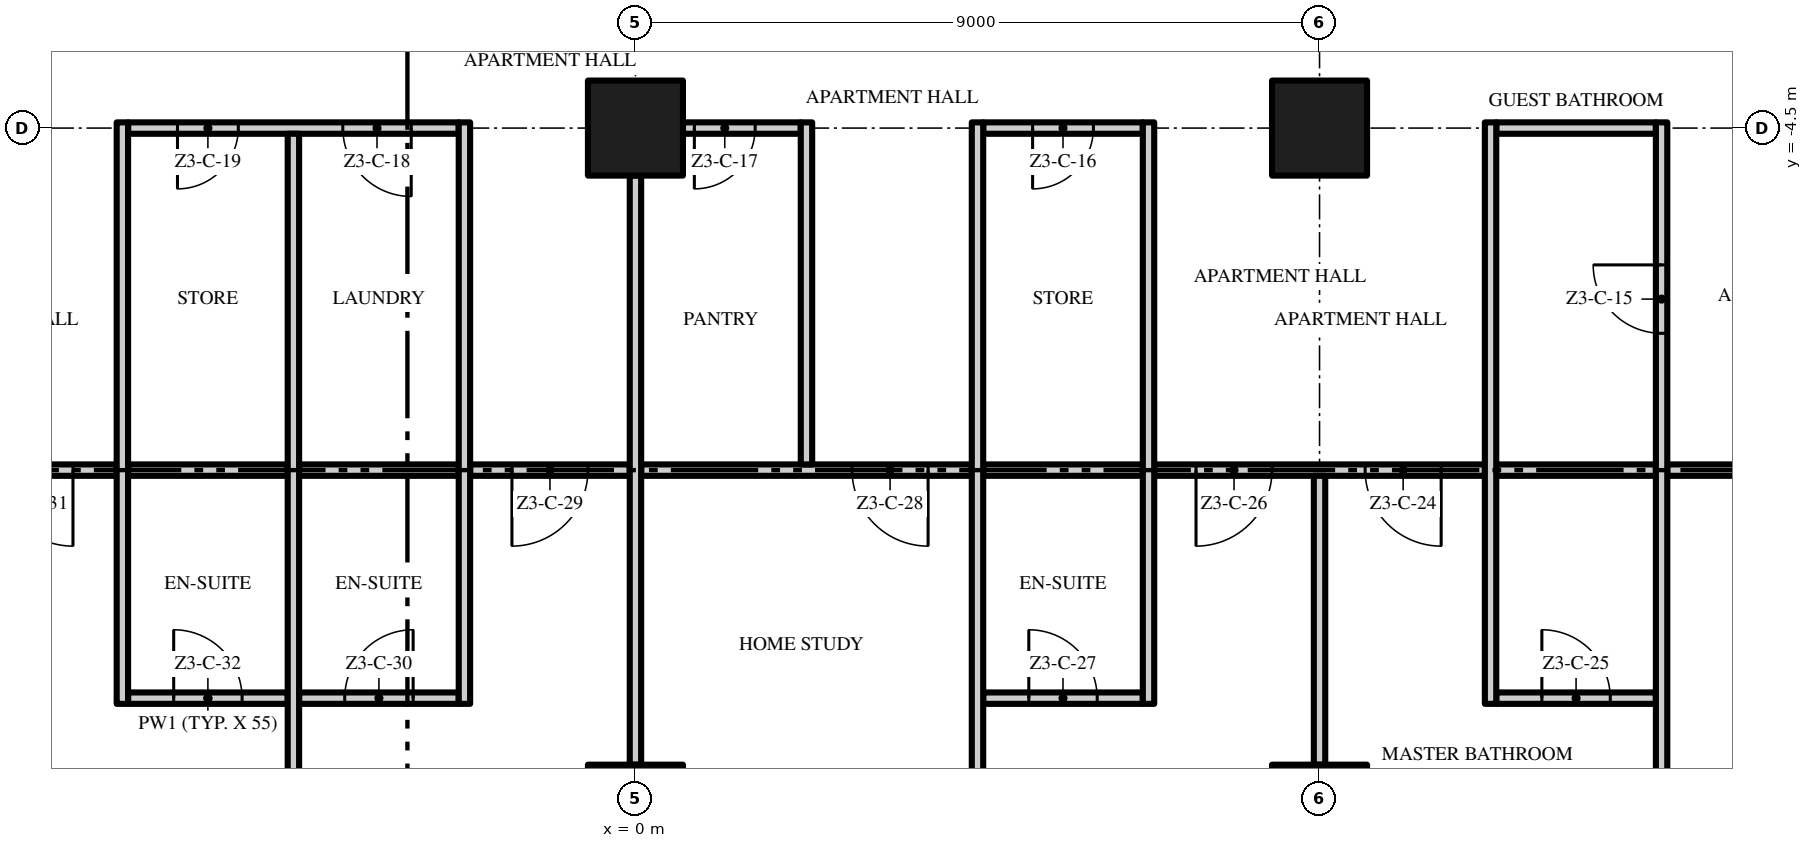
"""IFC4 building model, lengths in metres.
Left out: names, types, materials, properties, quantities, classifications, styles, units other than length and angle.
Written with IfcOpenShell. Run it as: python <this file> out.ifc"""

import sys

from ifc_helpers import new_model, si_unit, direction, frame, frame_2d, origin, origin_2d, place, context, subcontext, project, spatial, rectangle, extrude, element, fill, save


model = new_model("IFC4")
c1 = context("Model", 3, precision=1e-05, world=origin(), true_north=direction((0.0, 1.0)))
c2 = subcontext(c1, "Body", "Model", "MODEL_VIEW")
j1 = project(units=[si_unit("LENGTHUNIT", "METRE"), si_unit("PLANEANGLEUNIT", "RADIAN")], contexts=[c1])
p1 = place(None, origin())
s1 = spatial("IfcSite", under=j1, at=p1, CompositionType="ELEMENT")
p2 = place(p1, origin())
s2 = spatial("IfcBuilding", under=s1, at=p2, CompositionType="ELEMENT")
p3 = place(p2, frame((0.0, 0.0, 151.6)))
s3 = spatial("IfcBuildingStorey", under=s2, at=p3, CompositionType="ELEMENT", Elevation=151.6)
for number, where, z_axis, x_axis in (
    (1, (0.0, -13.5, 0.0), (0.0, 0.0, 1.0), (1.0, 0.0, 0.0)),
    (2, (0.0, -4.5, 0.0), (0.0, 0.0, 1.0), (1.0, 0.0, 0.0)),
    (3, (9.0, -13.5, 0.0), (0.0, 0.0, 1.0), (1.0, 0.0, 0.0)),
    (4, (9.0, -4.5, 0.0), (0.0, 0.0, 1.0), (1.0, 0.0, 0.0)),
):
    element("IfcColumn", number, at=place(p3, frame(where, z_axis=z_axis, x_axis=x_axis)), inside=s3, PredefinedType="COLUMN", context=c2, shape_type="SweptSolid", body=[
        extrude(rectangle(XDim=1.25, YDim=1.25, at=origin_2d()), origin(), (0.0, 0.0, 1.0), 3.5),
    ])
p4 = place(p3, frame((-6.675, -12.0, 0.0), z_axis=(0.0, 0.0, 1.0), x_axis=(1.0, 0.0, 0.0)))
e5 = element("IfcWall", 5, at=p4, inside=s3, PredefinedType="PARTITIONING", context=c2, shape_type="SweptSolid", body=[
    extrude(rectangle(XDim=2.1, YDim=0.15, at=frame_2d((1.05, 0.0))), origin(), (0.0, 0.0, 1.0), 3.5),
])
p5 = place(p4, frame((0.6, 0.0, 0.0)))
e6 = element("IfcOpeningElement", 6, at=p5, cuts=e5, PredefinedType="OPENING", context=c2, shape_type="SweptSolid", body=[
    extrude(rectangle(XDim=0.9, YDim=2.1, at=frame_2d((0.45, 1.05))), frame((0.0, 0.085, 0.0), z_axis=(0.0, -1.0, 0.0), x_axis=(1.0, 0.0, 0.0)), (0.0, 0.0, 1.0), 0.17),
])
p6 = place(p3, frame((-4.425, -12.0, 0.0), z_axis=(0.0, 0.0, 1.0), x_axis=(1.0, 0.0, 0.0)))
e7 = element("IfcWall", 7, at=p6, inside=s3, PredefinedType="PARTITIONING", context=c2, shape_type="SweptSolid", body=[
    extrude(rectangle(XDim=2.1, YDim=0.15, at=frame_2d((1.05, 0.0))), origin(), (0.0, 0.0, 1.0), 3.5),
])
p7 = place(p6, frame((0.6, 0.0, 0.0)))
e8 = element("IfcOpeningElement", 8, at=p7, cuts=e7, PredefinedType="OPENING", context=c2, shape_type="SweptSolid", body=[
    extrude(rectangle(XDim=0.9, YDim=2.1, at=frame_2d((0.45, 1.05))), frame((0.0, 0.085, 0.0), z_axis=(0.0, -1.0, 0.0), x_axis=(1.0, 0.0, 0.0)), (0.0, 0.0, 1.0), 0.17),
])
p8 = place(p3, frame((4.575, -12.0, 0.0), z_axis=(0.0, 0.0, 1.0), x_axis=(1.0, 0.0, 0.0)))
e9 = element("IfcWall", 9, at=p8, inside=s3, PredefinedType="PARTITIONING", context=c2, shape_type="SweptSolid", body=[
    extrude(rectangle(XDim=2.1, YDim=0.15, at=frame_2d((1.05, 0.0))), origin(), (0.0, 0.0, 1.0), 3.5),
])
p9 = place(p8, frame((0.6, 0.0, 0.0)))
e10 = element("IfcOpeningElement", 10, at=p9, cuts=e9, PredefinedType="OPENING", context=c2, shape_type="SweptSolid", body=[
    extrude(rectangle(XDim=0.9, YDim=2.1, at=frame_2d((0.45, 1.05))), frame((0.0, 0.085, 0.0), z_axis=(0.0, -1.0, 0.0), x_axis=(1.0, 0.0, 0.0)), (0.0, 0.0, 1.0), 0.17),
])
p10 = place(p3, frame((11.325, -12.0, 0.0), z_axis=(0.0, 0.0, 1.0), x_axis=(1.0, 0.0, 0.0)))
e11 = element("IfcWall", 11, at=p10, inside=s3, PredefinedType="PARTITIONING", context=c2, shape_type="SweptSolid", body=[
    extrude(rectangle(XDim=2.1, YDim=0.15, at=frame_2d((1.05, 0.0))), origin(), (0.0, 0.0, 1.0), 3.5),
])
p11 = place(p10, frame((0.6, 0.0, 0.0)))
e12 = element("IfcOpeningElement", 12, at=p11, cuts=e11, PredefinedType="OPENING", context=c2, shape_type="SweptSolid", body=[
    extrude(rectangle(XDim=0.9, YDim=2.1, at=frame_2d((0.45, 1.05))), frame((0.0, 0.085, 0.0), z_axis=(0.0, -1.0, 0.0), x_axis=(1.0, 0.0, 0.0)), (0.0, 0.0, 1.0), 0.17),
])
p12 = place(p3, frame((-6.825, -9.0, 0.0), z_axis=(0.0, 0.0, 1.0), x_axis=(-1.0, 0.0, 0.0)))
e13 = element("IfcWall", 13, at=p12, inside=s3, PredefinedType="PARTITIONING", context=c2, shape_type="SweptSolid", body=[
    extrude(rectangle(XDim=11.1, YDim=0.15, at=frame_2d((5.55, 0.0))), origin(), (0.0, 0.0, 1.0), 3.5),
])
p13 = place(p12, frame((0.575, 0.0, 0.0)))
e14 = element("IfcOpeningElement", 14, at=p13, cuts=e13, PredefinedType="OPENING", context=c2, shape_type="SweptSolid", body=[
    extrude(rectangle(XDim=1.0, YDim=2.4, at=frame_2d((0.5, 1.2))), frame((0.0, 0.085, 0.0), z_axis=(0.0, -1.0, 0.0), x_axis=(1.0, 0.0, 0.0)), (0.0, 0.0, 1.0), 0.17),
])
p14 = place(p12, frame((3.325, 0.0, 0.0)))
e15 = element("IfcOpeningElement", 15, at=p14, cuts=e13, PredefinedType="OPENING", context=c2, shape_type="SweptSolid", body=[
    extrude(rectangle(XDim=1.5, YDim=2.4, at=frame_2d((0.75, 1.2))), frame((0.0, 0.085, 0.0), z_axis=(0.0, -1.0, 0.0), x_axis=(1.0, 0.0, 0.0)), (0.0, 0.0, 1.0), 0.17),
])
for number, where, z_axis, x_axis in (
    (16, (-6.675, -9.0, 0.0), (0.0, 0.0, 1.0), (1.0, 0.0, 0.0)),
    (17, (-4.425, -9.0, 0.0), (0.0, 0.0, 1.0), (1.0, 0.0, 0.0)),
):
    element("IfcWall", number, at=place(p3, frame(where, z_axis=z_axis, x_axis=x_axis)), inside=s3, PredefinedType="PARTITIONING", context=c2, shape_type="SweptSolid", body=[
        extrude(rectangle(XDim=2.1, YDim=0.15, at=frame_2d((1.05, 0.0))), origin(), (0.0, 0.0, 1.0), 3.5),
    ])
p15 = place(p3, frame((-0.075, -9.0, 0.0), z_axis=(0.0, 0.0, 1.0), x_axis=(-1.0, 0.0, 0.0)))
e18 = element("IfcWall", 18, at=p15, inside=s3, PredefinedType="PARTITIONING", context=c2, shape_type="SweptSolid", body=[
    extrude(rectangle(XDim=2.1, YDim=0.15, at=frame_2d((1.05, 0.0))), origin(), (0.0, 0.0, 1.0), 3.5),
])
p16 = place(p15, frame((0.55, 0.0, 0.0)))
e19 = element("IfcOpeningElement", 19, at=p16, cuts=e18, PredefinedType="OPENING", context=c2, shape_type="SweptSolid", body=[
    extrude(rectangle(XDim=1.0, YDim=2.4, at=frame_2d((0.5, 1.2))), frame((0.0, 0.085, 0.0), z_axis=(0.0, -1.0, 0.0), x_axis=(1.0, 0.0, 0.0)), (0.0, 0.0, 1.0), 0.17),
])
p17 = place(p3, frame((4.425, -9.0, 0.0), z_axis=(0.0, 0.0, 1.0), x_axis=(-1.0, 0.0, 0.0)))
e20 = element("IfcWall", 20, at=p17, inside=s3, PredefinedType="PARTITIONING", context=c2, shape_type="SweptSolid", body=[
    extrude(rectangle(XDim=4.35, YDim=0.15, at=frame_2d((2.175, 0.0))), origin(), (0.0, 0.0, 1.0), 3.5),
])
p18 = place(p17, frame((0.575, 0.0, 0.0)))
e21 = element("IfcOpeningElement", 21, at=p18, cuts=e20, PredefinedType="OPENING", context=c2, shape_type="SweptSolid", body=[
    extrude(rectangle(XDim=1.0, YDim=2.4, at=frame_2d((0.5, 1.2))), frame((0.0, 0.085, 0.0), z_axis=(0.0, -1.0, 0.0), x_axis=(1.0, 0.0, 0.0)), (0.0, 0.0, 1.0), 0.17),
])
p19 = place(p3, frame((4.575, -9.0, 0.0), z_axis=(0.0, 0.0, 1.0), x_axis=(1.0, 0.0, 0.0)))
e22 = element("IfcWall", 22, at=p19, inside=s3, PredefinedType="PARTITIONING", context=c2, shape_type="SweptSolid", body=[
    extrude(rectangle(XDim=2.1, YDim=0.15, at=frame_2d((1.05, 0.0))), origin(), (0.0, 0.0, 1.0), 3.5),
])
p20 = place(p3, frame((11.175, -9.0, 0.0), z_axis=(0.0, 0.0, 1.0), x_axis=(-1.0, 0.0, 0.0)))
e23 = element("IfcWall", 23, at=p20, inside=s3, PredefinedType="PARTITIONING", context=c2, shape_type="SweptSolid", body=[
    extrude(rectangle(XDim=4.35, YDim=0.15, at=frame_2d((2.175, 0.0))), origin(), (0.0, 0.0, 1.0), 3.5),
])
p21 = place(p20, frame((0.575, 0.0, 0.0)))
e24 = element("IfcOpeningElement", 24, at=p21, cuts=e23, PredefinedType="OPENING", context=c2, shape_type="SweptSolid", body=[
    extrude(rectangle(XDim=1.0, YDim=2.4, at=frame_2d((0.5, 1.2))), frame((0.0, 0.085, 0.0), z_axis=(0.0, -1.0, 0.0), x_axis=(1.0, 0.0, 0.0)), (0.0, 0.0, 1.0), 0.17),
])
p22 = place(p20, frame((2.8, 0.0, 0.0)))
e25 = element("IfcOpeningElement", 25, at=p22, cuts=e23, PredefinedType="OPENING", context=c2, shape_type="SweptSolid", body=[
    extrude(rectangle(XDim=1.0, YDim=2.4, at=frame_2d((0.5, 1.2))), frame((0.0, 0.085, 0.0), z_axis=(0.0, -1.0, 0.0), x_axis=(1.0, 0.0, 0.0)), (0.0, 0.0, 1.0), 0.17),
])
p23 = place(p3, frame((11.325, -9.0, 0.0), z_axis=(0.0, 0.0, 1.0), x_axis=(1.0, 0.0, 0.0)))
e26 = element("IfcWall", 26, at=p23, inside=s3, PredefinedType="PARTITIONING", context=c2, shape_type="SweptSolid", body=[
    extrude(rectangle(XDim=2.1, YDim=0.15, at=frame_2d((1.05, 0.0))), origin(), (0.0, 0.0, 1.0), 3.5),
])
p24 = place(p3, frame((22.2, -9.0, 0.0), z_axis=(0.0, 0.0, 1.0), x_axis=(-1.0, 0.0, 0.0)))
e27 = element("IfcWall", 27, at=p24, inside=s3, PredefinedType="PARTITIONING", context=c2, shape_type="SweptSolid", body=[
    extrude(rectangle(XDim=8.625, YDim=0.15, at=frame_2d((4.312, 0.0))), origin(), (0.0, 0.0, 1.0), 3.5),
])
p25 = place(p24, frame((5.925, 0.0, 0.0)))
e28 = element("IfcOpeningElement", 28, at=p25, cuts=e27, PredefinedType="OPENING", context=c2, shape_type="SweptSolid", body=[
    extrude(rectangle(XDim=1.8, YDim=2.4, at=frame_2d((0.9, 1.2))), frame((0.0, 0.085, 0.0), z_axis=(0.0, -1.0, 0.0), x_axis=(1.0, 0.0, 0.0)), (0.0, 0.0, 1.0), 0.17),
])
p26 = place(p3, frame((-2.325, -4.5, 0.0), z_axis=(0.0, 0.0, 1.0), x_axis=(-1.0, 0.0, 0.0)))
e29 = element("IfcWall", 29, at=p26, inside=s3, PredefinedType="PARTITIONING", context=c2, shape_type="SweptSolid", body=[
    extrude(rectangle(XDim=4.35, YDim=0.15, at=frame_2d((2.175, 0.0))), origin(), (0.0, 0.0, 1.0), 3.5),
])
p27 = place(p26, frame((0.625, 0.0, 0.0)))
e30 = element("IfcOpeningElement", 30, at=p27, cuts=e29, PredefinedType="OPENING", context=c2, shape_type="SweptSolid", body=[
    extrude(rectangle(XDim=0.9, YDim=2.1, at=frame_2d((0.45, 1.05))), frame((0.0, 0.085, 0.0), z_axis=(0.0, -1.0, 0.0), x_axis=(1.0, 0.0, 0.0)), (0.0, 0.0, 1.0), 0.17),
])
p28 = place(p26, frame((2.9, 0.0, 0.0)))
e31 = element("IfcOpeningElement", 31, at=p28, cuts=e29, PredefinedType="OPENING", context=c2, shape_type="SweptSolid", body=[
    extrude(rectangle(XDim=0.8, YDim=2.0, at=frame_2d((0.4, 1.0))), frame((0.0, 0.085, 0.0), z_axis=(0.0, -1.0, 0.0), x_axis=(1.0, 0.0, 0.0)), (0.0, 0.0, 1.0), 0.17),
])
p29 = place(p3, frame((2.175, -4.5, 0.0), z_axis=(0.0, 0.0, 1.0), x_axis=(-1.0, 0.0, 0.0)))
e32 = element("IfcWall", 32, at=p29, inside=s3, PredefinedType="PARTITIONING", context=c2, shape_type="SweptSolid", body=[
    extrude(rectangle(XDim=1.55, YDim=0.15, at=frame_2d((0.775, 0.0))), origin(), (0.0, 0.0, 1.0), 3.5),
])
p30 = place(p29, frame((0.6, 0.0, 0.0)))
e33 = element("IfcOpeningElement", 33, at=p30, cuts=e32, PredefinedType="OPENING", context=c2, shape_type="SweptSolid", body=[
    extrude(rectangle(XDim=0.8, YDim=2.0, at=frame_2d((0.4, 1.0))), frame((0.0, 0.085, 0.0), z_axis=(0.0, -1.0, 0.0), x_axis=(1.0, 0.0, 0.0)), (0.0, 0.0, 1.0), 0.17),
])
p31 = place(p3, frame((6.675, -4.5, 0.0), z_axis=(0.0, 0.0, 1.0), x_axis=(-1.0, 0.0, 0.0)))
e34 = element("IfcWall", 34, at=p31, inside=s3, PredefinedType="PARTITIONING", context=c2, shape_type="SweptSolid", body=[
    extrude(rectangle(XDim=2.1, YDim=0.15, at=frame_2d((1.05, 0.0))), origin(), (0.0, 0.0, 1.0), 3.5),
])
p32 = place(p31, frame((0.65, 0.0, 0.0)))
e35 = element("IfcOpeningElement", 35, at=p32, cuts=e34, PredefinedType="OPENING", context=c2, shape_type="SweptSolid", body=[
    extrude(rectangle(XDim=0.8, YDim=2.0, at=frame_2d((0.4, 1.0))), frame((0.0, 0.085, 0.0), z_axis=(0.0, -1.0, 0.0), x_axis=(1.0, 0.0, 0.0)), (0.0, 0.0, 1.0), 0.17),
])
p33 = place(p3, frame((11.325, -4.5, 0.0), z_axis=(0.0, 0.0, 1.0), x_axis=(1.0, 0.0, 0.0)))
e36 = element("IfcWall", 36, at=p33, inside=s3, PredefinedType="PARTITIONING", context=c2, shape_type="SweptSolid", body=[
    extrude(rectangle(XDim=2.1, YDim=0.15, at=frame_2d((1.05, 0.0))), origin(), (0.0, 0.0, 1.0), 3.5),
])
p34 = place(p3, frame((-6.75, -12.075, 0.0), z_axis=(0.0, 0.0, 1.0), x_axis=(0.0, 1.0, 0.0)))
e37 = element("IfcWall", 37, at=p34, inside=s3, PredefinedType="PARTITIONING", context=c2, shape_type="SweptSolid", body=[
    extrude(rectangle(XDim=7.65, YDim=0.15, at=frame_2d((3.825, 0.0))), origin(), (0.0, 0.0, 1.0), 3.5),
])
p35 = place(p3, frame((-4.5, -17.7, 0.0), z_axis=(0.0, 0.0, 1.0), x_axis=(0.0, 1.0, 0.0)))
e38 = element("IfcWall", 38, at=p35, inside=s3, PredefinedType="PARTITIONING", context=c2, shape_type="SweptSolid", body=[
    extrude(rectangle(XDim=13.125, YDim=0.15, at=frame_2d((6.562, 0.0))), origin(), (0.0, 0.0, 1.0), 3.5),
])
p36 = place(p3, frame((-2.25, -12.075, 0.0), z_axis=(0.0, 0.0, 1.0), x_axis=(0.0, 1.0, 0.0)))
e39 = element("IfcWall", 39, at=p36, inside=s3, PredefinedType="PARTITIONING", context=c2, shape_type="SweptSolid", body=[
    extrude(rectangle(XDim=7.65, YDim=0.15, at=frame_2d((3.825, 0.0))), origin(), (0.0, 0.0, 1.0), 3.5),
])
p37 = place(p3, frame((0.0, -12.875, 0.0), z_axis=(0.0, 0.0, 1.0), x_axis=(0.0, 1.0, 0.0)))
e40 = element("IfcWall", 40, at=p37, inside=s3, PredefinedType="PARTITIONING", context=c2, shape_type="SweptSolid", body=[
    extrude(rectangle(XDim=7.75, YDim=0.15, at=frame_2d((3.875, 0.0))), origin(), (0.0, 0.0, 1.0), 3.5),
])
p38 = place(p3, frame((2.25, -8.925, 0.0), z_axis=(0.0, 0.0, 1.0), x_axis=(0.0, 1.0, 0.0)))
e41 = element("IfcWall", 41, at=p38, inside=s3, PredefinedType="PARTITIONING", context=c2, shape_type="SweptSolid", body=[
    extrude(rectangle(XDim=4.5, YDim=0.15, at=frame_2d((2.25, 0.0))), origin(), (0.0, 0.0, 1.0), 3.5),
])
p39 = place(p3, frame((4.5, -17.7, 0.0), z_axis=(0.0, 0.0, 1.0), x_axis=(0.0, 1.0, 0.0)))
e42 = element("IfcWall", 42, at=p39, inside=s3, PredefinedType="PARTITIONING", context=c2, shape_type="SweptSolid", body=[
    extrude(rectangle(XDim=13.275, YDim=0.15, at=frame_2d((6.638, 0.0))), origin(), (0.0, 0.0, 1.0), 3.5),
])
p40 = place(p3, frame((6.75, -12.075, 0.0), z_axis=(0.0, 0.0, 1.0), x_axis=(0.0, 1.0, 0.0)))
e43 = element("IfcWall", 43, at=p40, inside=s3, PredefinedType="PARTITIONING", context=c2, shape_type="SweptSolid", body=[
    extrude(rectangle(XDim=7.65, YDim=0.15, at=frame_2d((3.825, 0.0))), origin(), (0.0, 0.0, 1.0), 3.5),
])
p41 = place(p3, frame((9.0, -12.875, 0.0), z_axis=(0.0, 0.0, 1.0), x_axis=(0.0, 1.0, 0.0)))
e44 = element("IfcWall", 44, at=p41, inside=s3, PredefinedType="PARTITIONING", context=c2, shape_type="SweptSolid", body=[
    extrude(rectangle(XDim=3.8, YDim=0.15, at=frame_2d((1.9, 0.0))), origin(), (0.0, 0.0, 1.0), 3.5),
])
p42 = place(p3, frame((11.25, -12.075, 0.0), z_axis=(0.0, 0.0, 1.0), x_axis=(0.0, 1.0, 0.0)))
e45 = element("IfcWall", 45, at=p42, inside=s3, PredefinedType="PARTITIONING", context=c2, shape_type="SweptSolid", body=[
    extrude(rectangle(XDim=7.65, YDim=0.15, at=frame_2d((3.825, 0.0))), origin(), (0.0, 0.0, 1.0), 3.5),
])
p43 = place(p3, frame((13.5, -17.7, 0.0), z_axis=(0.0, 0.0, 1.0), x_axis=(0.0, 1.0, 0.0)))
e46 = element("IfcWall", 46, at=p43, inside=s3, PredefinedType="PARTITIONING", context=c2, shape_type="SweptSolid", body=[
    extrude(rectangle(XDim=13.275, YDim=0.15, at=frame_2d((6.638, 0.0))), origin(), (0.0, 0.0, 1.0), 3.5),
])
p44 = place(p43, frame((10.5, 0.0, 0.0)))
e47 = element("IfcOpeningElement", 47, at=p44, cuts=e46, PredefinedType="OPENING", context=c2, shape_type="SweptSolid", body=[
    extrude(rectangle(XDim=0.9, YDim=2.1, at=frame_2d((0.45, 1.05))), frame((0.0, 0.085, 0.0), z_axis=(0.0, -1.0, 0.0), x_axis=(1.0, 0.0, 0.0)), (0.0, 0.0, 1.0), 0.17),
])
p45 = place(p44, origin())
e48 = element("IfcDoor", 48, at=p45, inside=s3, OperationType="SINGLE_SWING_RIGHT", PredefinedType="DOOR", context=c2, shape_type="SweptSolid", body=[
    extrude(rectangle(XDim=0.9, YDim=2.1, at=frame_2d((0.45, 1.05))), frame((0.0, 0.025, 0.0), z_axis=(0.0, -1.0, 0.0), x_axis=(1.0, 0.0, 0.0)), (0.0, 0.0, 1.0), 0.05),
])
fill(e47, e48)
p46 = place(p32, origin())
e49 = element("IfcDoor", 49, at=p46, inside=s3, OperationType="SINGLE_SWING_RIGHT", PredefinedType="DOOR", context=c2, shape_type="SweptSolid", body=[
    extrude(rectangle(XDim=0.8, YDim=2.0, at=frame_2d((0.4, 1.0))), frame((0.0, 0.025, 0.0), z_axis=(0.0, -1.0, 0.0), x_axis=(1.0, 0.0, 0.0)), (0.0, 0.0, 1.0), 0.05),
])
fill(e35, e49)
p47 = place(p30, origin())
e50 = element("IfcDoor", 50, at=p47, inside=s3, OperationType="SINGLE_SWING_RIGHT", PredefinedType="DOOR", context=c2, shape_type="SweptSolid", body=[
    extrude(rectangle(XDim=0.8, YDim=2.0, at=frame_2d((0.4, 1.0))), frame((0.0, 0.025, 0.0), z_axis=(0.0, -1.0, 0.0), x_axis=(1.0, 0.0, 0.0)), (0.0, 0.0, 1.0), 0.05),
])
fill(e33, e50)
p48 = place(p27, origin())
e51 = element("IfcDoor", 51, at=p48, inside=s3, OperationType="SINGLE_SWING_LEFT", PredefinedType="DOOR", context=c2, shape_type="SweptSolid", body=[
    extrude(rectangle(XDim=0.9, YDim=2.1, at=frame_2d((0.45, 1.05))), frame((0.0, 0.025, 0.0), z_axis=(0.0, -1.0, 0.0), x_axis=(1.0, 0.0, 0.0)), (0.0, 0.0, 1.0), 0.05),
])
fill(e30, e51)
p49 = place(p28, origin())
e52 = element("IfcDoor", 52, at=p49, inside=s3, OperationType="SINGLE_SWING_RIGHT", PredefinedType="DOOR", context=c2, shape_type="SweptSolid", body=[
    extrude(rectangle(XDim=0.8, YDim=2.0, at=frame_2d((0.4, 1.0))), frame((0.0, 0.025, 0.0), z_axis=(0.0, -1.0, 0.0), x_axis=(1.0, 0.0, 0.0)), (0.0, 0.0, 1.0), 0.05),
])
fill(e31, e52)
p50 = place(p21, origin())
e53 = element("IfcDoor", 53, at=p50, inside=s3, OperationType="SINGLE_SWING_LEFT", PredefinedType="DOOR", context=c2, shape_type="SweptSolid", body=[
    extrude(rectangle(XDim=1.0, YDim=2.4, at=frame_2d((0.5, 1.2))), frame((0.0, 0.025, 0.0), z_axis=(0.0, -1.0, 0.0), x_axis=(1.0, 0.0, 0.0)), (0.0, 0.0, 1.0), 0.05),
])
fill(e24, e53)
p51 = place(p11, origin())
e54 = element("IfcDoor", 54, at=p51, inside=s3, OperationType="SINGLE_SWING_LEFT", PredefinedType="DOOR", context=c2, shape_type="SweptSolid", body=[
    extrude(rectangle(XDim=0.9, YDim=2.1, at=frame_2d((0.45, 1.05))), frame((0.0, 0.025, 0.0), z_axis=(0.0, -1.0, 0.0), x_axis=(1.0, 0.0, 0.0)), (0.0, 0.0, 1.0), 0.05),
])
fill(e12, e54)
p52 = place(p22, origin())
e55 = element("IfcDoor", 55, at=p52, inside=s3, OperationType="SINGLE_SWING_RIGHT", PredefinedType="DOOR", context=c2, shape_type="SweptSolid", body=[
    extrude(rectangle(XDim=1.0, YDim=2.4, at=frame_2d((0.5, 1.2))), frame((0.0, 0.025, 0.0), z_axis=(0.0, -1.0, 0.0), x_axis=(1.0, 0.0, 0.0)), (0.0, 0.0, 1.0), 0.05),
])
fill(e25, e55)
p53 = place(p9, origin())
e56 = element("IfcDoor", 56, at=p53, inside=s3, OperationType="SINGLE_SWING_LEFT", PredefinedType="DOOR", context=c2, shape_type="SweptSolid", body=[
    extrude(rectangle(XDim=0.9, YDim=2.1, at=frame_2d((0.45, 1.05))), frame((0.0, 0.025, 0.0), z_axis=(0.0, -1.0, 0.0), x_axis=(1.0, 0.0, 0.0)), (0.0, 0.0, 1.0), 0.05),
])
fill(e10, e56)
p54 = place(p18, origin())
e57 = element("IfcDoor", 57, at=p54, inside=s3, OperationType="SINGLE_SWING_LEFT", PredefinedType="DOOR", context=c2, shape_type="SweptSolid", body=[
    extrude(rectangle(XDim=1.0, YDim=2.4, at=frame_2d((0.5, 1.2))), frame((0.0, 0.025, 0.0), z_axis=(0.0, -1.0, 0.0), x_axis=(1.0, 0.0, 0.0)), (0.0, 0.0, 1.0), 0.05),
])
fill(e21, e57)
p55 = place(p16, origin())
e58 = element("IfcDoor", 58, at=p55, inside=s3, OperationType="SINGLE_SWING_RIGHT", PredefinedType="DOOR", context=c2, shape_type="SweptSolid", body=[
    extrude(rectangle(XDim=1.0, YDim=2.4, at=frame_2d((0.5, 1.2))), frame((0.0, 0.025, 0.0), z_axis=(0.0, -1.0, 0.0), x_axis=(1.0, 0.0, 0.0)), (0.0, 0.0, 1.0), 0.05),
])
fill(e19, e58)
p56 = place(p7, origin())
e59 = element("IfcDoor", 59, at=p56, inside=s3, OperationType="SINGLE_SWING_RIGHT", PredefinedType="DOOR", context=c2, shape_type="SweptSolid", body=[
    extrude(rectangle(XDim=0.9, YDim=2.1, at=frame_2d((0.45, 1.05))), frame((0.0, 0.025, 0.0), z_axis=(0.0, -1.0, 0.0), x_axis=(1.0, 0.0, 0.0)), (0.0, 0.0, 1.0), 0.05),
])
fill(e8, e59)
p57 = place(p13, origin())
e60 = element("IfcDoor", 60, at=p57, inside=s3, OperationType="SINGLE_SWING_LEFT", PredefinedType="DOOR", context=c2, shape_type="SweptSolid", body=[
    extrude(rectangle(XDim=1.0, YDim=2.4, at=frame_2d((0.5, 1.2))), frame((0.0, 0.025, 0.0), z_axis=(0.0, -1.0, 0.0), x_axis=(1.0, 0.0, 0.0)), (0.0, 0.0, 1.0), 0.05),
])
fill(e14, e60)
p58 = place(p5, origin())
e61 = element("IfcDoor", 61, at=p58, inside=s3, OperationType="SINGLE_SWING_LEFT", PredefinedType="DOOR", context=c2, shape_type="SweptSolid", body=[
    extrude(rectangle(XDim=0.9, YDim=2.1, at=frame_2d((0.45, 1.05))), frame((0.0, 0.025, 0.0), z_axis=(0.0, -1.0, 0.0), x_axis=(1.0, 0.0, 0.0)), (0.0, 0.0, 1.0), 0.05),
])
fill(e6, e61)
save(model, sys.argv[1])
